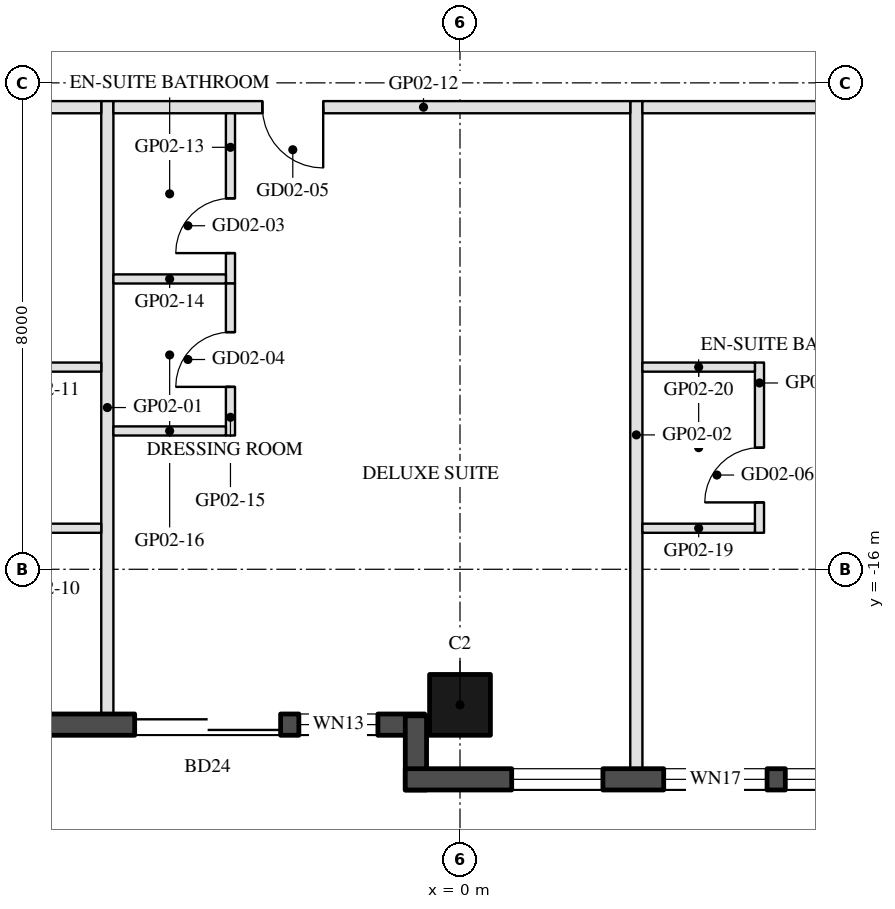
"""IFC4 building model, lengths in metres.
Left out: names, types, materials, properties, quantities, classifications, styles, units other than length and angle.
Written with IfcOpenShell. Run it as: python <this file> out.ifc"""

import sys

from ifc_helpers import new_model, si_unit, direction, frame, frame_2d, origin, origin_2d, place, context, subcontext, project, spatial, rectangle, hollow_rectangle, extrude, element, fill, save


model = new_model("IFC4")
c1 = context("Model", 3, precision=1e-05, world=origin(), true_north=direction((0.0, 1.0)))
c2 = subcontext(c1, "Body", "Model", "MODEL_VIEW")
j1 = project(units=[si_unit("LENGTHUNIT", "METRE"), si_unit("PLANEANGLEUNIT", "RADIAN")], contexts=[c1])
p1 = place(None, origin())
s1 = spatial("IfcSite", under=j1, at=p1, CompositionType="ELEMENT")
p2 = place(p1, origin())
s2 = spatial("IfcBuilding", under=s1, at=p2, CompositionType="ELEMENT")
p3 = place(p2, frame((0.0, 0.0, 53.9)))
s3 = spatial("IfcBuildingStorey", under=s2, at=p3, CompositionType="ELEMENT", Elevation=53.9)
p4 = place(p3, frame((0.0, -18.23, 0.0), z_axis=(0.0, 0.0, 1.0), x_axis=(-1.0, 0.0, 0.0)))
e1 = element("IfcColumn", 1, at=p4, inside=s3, PredefinedType="COLUMN", context=c2, shape_type="SweptSolid", body=[
    extrude(hollow_rectangle(XDim=1.0, YDim=1.0, WallThickness=0.045, at=origin_2d()), origin(), (0.0, 0.0, 1.0), 3.7),
])
p5 = place(p3, frame((-7.32, -18.555, 0.0), z_axis=(0.0, 0.0, 1.0), x_axis=(1.0, 0.0, 0.0)))
e2 = element("IfcWall", 2, at=p5, inside=s3, PredefinedType="SOLIDWALL", context=c2, shape_type="SweptSolid", body=[
    extrude(rectangle(XDim=6.74, YDim=0.35, at=frame_2d((3.37, 0.0))), origin(), (0.0, 0.0, 1.0), 3.55),
])
p6 = place(p5, frame((1.97, 0.0, 0.0)))
e3 = element("IfcOpeningElement", 3, at=p6, cuts=e2, PredefinedType="OPENING", context=c2, shape_type="SweptSolid", body=[
    extrude(rectangle(XDim=2.4, YDim=2.4, at=frame_2d((1.2, 1.2))), frame((0.0, 0.185, 0.0), z_axis=(0.0, -1.0, 0.0), x_axis=(1.0, 0.0, 0.0)), (0.0, 0.0, 1.0), 0.37),
])
p7 = place(p5, frame((4.67, 0.0, 0.3)))
e4 = element("IfcOpeningElement", 4, at=p7, cuts=e2, PredefinedType="OPENING", context=c2, shape_type="SweptSolid", body=[
    extrude(rectangle(XDim=1.3, YDim=2.65, at=frame_2d((0.65, 1.325))), frame((0.0, 0.185, 0.0), z_axis=(0.0, -1.0, 0.0), x_axis=(1.0, 0.0, 0.0)), (0.0, 0.0, 1.0), 0.37),
])
p8 = place(p3, frame((-0.725, -18.41, 0.0), z_axis=(0.0, 0.0, 1.0), x_axis=(0.0, -1.0, 0.0)))
e5 = element("IfcWall", 5, at=p8, inside=s3, PredefinedType="SOLIDWALL", context=c2, shape_type="SweptSolid", body=[
    extrude(rectangle(XDim=1.22, YDim=0.35, at=frame_2d((0.61, 0.0))), origin(), (0.0, 0.0, 1.0), 3.55),
])
p9 = place(p3, frame((-0.9, -19.455, 0.0), z_axis=(0.0, 0.0, 1.0), x_axis=(1.0, 0.0, 0.0)))
e6 = element("IfcWall", 6, at=p9, inside=s3, PredefinedType="SOLIDWALL", context=c2, shape_type="SweptSolid", body=[
    extrude(rectangle(XDim=9.7, YDim=0.35, at=frame_2d((4.85, 0.0))), origin(), (0.0, 0.0, 1.0), 3.55),
])
p10 = place(p9, frame((1.75, 0.0, 0.3)))
e7 = element("IfcOpeningElement", 7, at=p10, cuts=e6, PredefinedType="OPENING", context=c2, shape_type="SweptSolid", body=[
    extrude(rectangle(XDim=1.5, YDim=2.65, at=frame_2d((0.75, 1.325))), frame((0.0, 0.185, 0.0), z_axis=(0.0, -1.0, 0.0), x_axis=(1.0, 0.0, 0.0)), (0.0, 0.0, 1.0), 0.37),
])
p11 = place(p9, frame((4.25, 0.0, 0.3)))
e8 = element("IfcOpeningElement", 8, at=p11, cuts=e6, PredefinedType="OPENING", context=c2, shape_type="SweptSolid", body=[
    extrude(rectangle(XDim=1.7, YDim=2.65, at=frame_2d((0.85, 1.325))), frame((0.0, 0.185, 0.0), z_axis=(0.0, -1.0, 0.0), x_axis=(1.0, 0.0, 0.0)), (0.0, 0.0, 1.0), 0.37),
])
p12 = place(p9, frame((6.25, 0.0, 0.3)))
e9 = element("IfcOpeningElement", 9, at=p12, cuts=e6, PredefinedType="OPENING", context=c2, shape_type="SweptSolid", body=[
    extrude(rectangle(XDim=1.7, YDim=2.65, at=frame_2d((0.85, 1.325))), frame((0.0, 0.185, 0.0), z_axis=(0.0, -1.0, 0.0), x_axis=(1.0, 0.0, 0.0)), (0.0, 0.0, 1.0), 0.37),
])
p13 = place(p3, frame((-5.8, -18.38, 0.0), z_axis=(0.0, 0.0, 1.0), x_axis=(0.0, 1.0, 0.0)))
e10 = element("IfcWall", 10, at=p13, inside=s3, PredefinedType="PARTITIONING", context=c2, shape_type="SweptSolid", body=[
    extrude(rectangle(XDim=10.08, YDim=0.2, at=frame_2d((5.04, 0.0))), origin(), (0.0, 0.0, 1.0), 2.96),
])
p14 = place(p3, frame((2.9, -19.28, 0.0), z_axis=(0.0, 0.0, 1.0), x_axis=(0.0, 1.0, 0.0)))
e11 = element("IfcWall", 11, at=p14, inside=s3, PredefinedType="PARTITIONING", context=c2, shape_type="SweptSolid", body=[
    extrude(rectangle(XDim=10.98, YDim=0.2, at=frame_2d((5.49, 0.0))), origin(), (0.0, 0.0, 1.0), 2.96),
])
p15 = place(p3, frame((-5.9, -8.4, 0.0), z_axis=(0.0, 0.0, 1.0), x_axis=(-1.0, 0.0, 0.0)))
e12 = element("IfcWall", 12, at=p15, inside=s3, PredefinedType="PARTITIONING", context=c2, shape_type="SweptSolid", body=[
    extrude(rectangle(XDim=4.088, YDim=0.2, at=frame_2d((2.044, 0.0))), origin(), (0.0, 0.0, 1.0), 2.95),
])
p16 = place(p15, frame((1.544, 0.0, 0.0)))
e13 = element("IfcOpeningElement", 13, at=p16, cuts=e12, PredefinedType="OPENING", context=c2, shape_type="SweptSolid", body=[
    extrude(rectangle(XDim=1.0, YDim=2.1, at=frame_2d((0.5, 1.05))), frame((0.0, 0.11, 0.0), z_axis=(0.0, -1.0, 0.0), x_axis=(1.0, 0.0, 0.0)), (0.0, 0.0, 1.0), 0.22),
])
for number, where, z_axis, x_axis in (
    (14, (-7.75, -15.325, 0.0), (0.0, 0.0, 1.0), (1.0, 0.0, 0.0)),
    (15, (-7.75, -12.675, 0.0), (0.0, 0.0, 1.0), (1.0, 0.0, 0.0)),
):
    element("IfcWall", number, at=place(p3, frame(where, z_axis=z_axis, x_axis=x_axis)), inside=s3, PredefinedType="PARTITIONING", context=c2, shape_type="SweptSolid", body=[
        extrude(rectangle(XDim=1.85, YDim=0.15, at=frame_2d((0.925, 0.0))), origin(), (0.0, 0.0, 1.0), 3.55),
    ])
p17 = place(p3, frame((2.8, -8.4, 0.0), z_axis=(0.0, 0.0, 1.0), x_axis=(-1.0, 0.0, 0.0)))
e16 = element("IfcWall", 16, at=p17, inside=s3, PredefinedType="PARTITIONING", context=c2, shape_type="SweptSolid", body=[
    extrude(rectangle(XDim=8.5, YDim=0.2, at=frame_2d((4.25, 0.0))), origin(), (0.0, 0.0, 1.0), 2.95),
])
p18 = place(p17, frame((5.05, 0.0, 0.0)))
e17 = element("IfcOpeningElement", 17, at=p18, cuts=e16, PredefinedType="OPENING", context=c2, shape_type="SweptSolid", body=[
    extrude(rectangle(XDim=1.0, YDim=2.1, at=frame_2d((0.5, 1.05))), frame((0.0, 0.11, 0.0), z_axis=(0.0, -1.0, 0.0), x_axis=(1.0, 0.0, 0.0)), (0.0, 0.0, 1.0), 0.22),
])
p19 = place(p3, frame((-3.775, -11.3, 0.0), z_axis=(0.0, 0.0, 1.0), x_axis=(0.0, 1.0, 0.0)))
e18 = element("IfcWall", 18, at=p19, inside=s3, PredefinedType="PARTITIONING", context=c2, shape_type="SweptSolid", body=[
    extrude(rectangle(XDim=2.8, YDim=0.15, at=frame_2d((1.4, 0.0))), origin(), (0.0, 0.0, 1.0), 2.95),
])
p20 = place(p19, frame((0.5, 0.0, 0.0)))
e19 = element("IfcOpeningElement", 19, at=p20, cuts=e18, PredefinedType="OPENING", context=c2, shape_type="SweptSolid", body=[
    extrude(rectangle(XDim=0.9, YDim=2.1, at=frame_2d((0.45, 1.05))), frame((0.0, 0.085, 0.0), z_axis=(0.0, -1.0, 0.0), x_axis=(1.0, 0.0, 0.0)), (0.0, 0.0, 1.0), 0.17),
])
p21 = place(p3, frame((-5.7, -11.225, 0.0), z_axis=(0.0, 0.0, 1.0), x_axis=(1.0, 0.0, 0.0)))
e20 = element("IfcWall", 20, at=p21, inside=s3, PredefinedType="PARTITIONING", context=c2, shape_type="SweptSolid", body=[
    extrude(rectangle(XDim=1.85, YDim=0.15, at=frame_2d((0.925, 0.0))), origin(), (0.0, 0.0, 1.0), 2.95),
])
p22 = place(p3, frame((-3.775, -13.8, 0.0), z_axis=(0.0, 0.0, 1.0), x_axis=(0.0, 1.0, 0.0)))
e21 = element("IfcWall", 21, at=p22, inside=s3, PredefinedType="PARTITIONING", context=c2, shape_type="SweptSolid", body=[
    extrude(rectangle(XDim=2.5, YDim=0.15, at=frame_2d((1.25, 0.0))), origin(), (0.0, 0.0, 1.0), 2.95),
])
p23 = place(p22, frame((0.8, 0.0, 0.0)))
e22 = element("IfcOpeningElement", 22, at=p23, cuts=e21, PredefinedType="OPENING", context=c2, shape_type="SweptSolid", body=[
    extrude(rectangle(XDim=0.9, YDim=2.1, at=frame_2d((0.45, 1.05))), frame((0.0, 0.085, 0.0), z_axis=(0.0, -1.0, 0.0), x_axis=(1.0, 0.0, 0.0)), (0.0, 0.0, 1.0), 0.17),
])
p24 = place(p3, frame((-5.7, -13.725, 0.0), z_axis=(0.0, 0.0, 1.0), x_axis=(1.0, 0.0, 0.0)))
e23 = element("IfcWall", 23, at=p24, inside=s3, PredefinedType="PARTITIONING", context=c2, shape_type="SweptSolid", body=[
    extrude(rectangle(XDim=1.85, YDim=0.15, at=frame_2d((0.925, 0.0))), origin(), (0.0, 0.0, 1.0), 2.95),
])
p25 = place(p3, frame((9.988, -8.4, 0.0), z_axis=(0.0, 0.0, 1.0), x_axis=(-1.0, 0.0, 0.0)))
e24 = element("IfcWall", 24, at=p25, inside=s3, PredefinedType="PARTITIONING", context=c2, shape_type="SweptSolid", body=[
    extrude(rectangle(XDim=6.988, YDim=0.2, at=frame_2d((3.494, 0.0))), origin(), (0.0, 0.0, 1.0), 2.95),
])
p26 = place(p25, frame((2.994, 0.0, 0.0)))
e25 = element("IfcOpeningElement", 25, at=p26, cuts=e24, PredefinedType="OPENING", context=c2, shape_type="SweptSolid", body=[
    extrude(rectangle(XDim=1.0, YDim=2.1, at=frame_2d((0.5, 1.05))), frame((0.0, 0.11, 0.0), z_axis=(0.0, -1.0, 0.0), x_axis=(1.0, 0.0, 0.0)), (0.0, 0.0, 1.0), 0.22),
])
p27 = place(p3, frame((4.925, -15.4, 0.0), z_axis=(0.0, 0.0, 1.0), x_axis=(0.0, 1.0, 0.0)))
e26 = element("IfcWall", 26, at=p27, inside=s3, PredefinedType="PARTITIONING", context=c2, shape_type="SweptSolid", body=[
    extrude(rectangle(XDim=2.8, YDim=0.15, at=frame_2d((1.4, 0.0))), origin(), (0.0, 0.0, 1.0), 3.55),
])
p28 = place(p27, frame((0.5, 0.0, 0.0)))
e27 = element("IfcOpeningElement", 27, at=p28, cuts=e26, PredefinedType="OPENING", context=c2, shape_type="SweptSolid", body=[
    extrude(rectangle(XDim=0.9, YDim=2.1, at=frame_2d((0.45, 1.05))), frame((0.0, 0.085, 0.0), z_axis=(0.0, -1.0, 0.0), x_axis=(1.0, 0.0, 0.0)), (0.0, 0.0, 1.0), 0.17),
])
for number, where, z_axis, x_axis in (
    (28, (3.0, -15.325, 0.0), (0.0, 0.0, 1.0), (1.0, 0.0, 0.0)),
    (29, (3.0, -12.675, 0.0), (0.0, 0.0, 1.0), (1.0, 0.0, 0.0)),
):
    element("IfcWall", number, at=place(p3, frame(where, z_axis=z_axis, x_axis=x_axis)), inside=s3, PredefinedType="PARTITIONING", context=c2, shape_type="SweptSolid", body=[
        extrude(rectangle(XDim=1.85, YDim=0.15, at=frame_2d((0.925, 0.0))), origin(), (0.0, 0.0, 1.0), 2.95),
    ])
p29 = place(p6, frame((2.4, 0.0, 0.0), z_axis=(0.0, 0.0, 1.0), x_axis=(-1.0, 0.0, 0.0)))
e30 = element("IfcDoor", 30, at=p29, inside=s3, OperationType="SLIDING_TO_LEFT", PredefinedType="DOOR", context=c2, shape_type="SweptSolid", body=[
    extrude(rectangle(XDim=2.4, YDim=2.4, at=frame_2d((1.2, 1.2))), frame((0.0, 0.025, 0.0), z_axis=(0.0, -1.0, 0.0), x_axis=(1.0, 0.0, 0.0)), (0.0, 0.0, 1.0), 0.05),
])
fill(e3, e30)
p30 = place(p7, origin())
e31 = element("IfcWindow", 31, at=p30, inside=s3, PartitioningType="SINGLE_PANEL", PredefinedType="WINDOW", context=c2, shape_type="SweptSolid", body=[
    extrude(rectangle(XDim=1.3, YDim=2.65, at=frame_2d((0.65, 1.325))), frame((0.0, 0.03, 0.0), z_axis=(0.0, -1.0, 0.0), x_axis=(1.0, 0.0, 0.0)), (0.0, 0.0, 1.0), 0.06),
])
fill(e4, e31)
p31 = place(p10, origin())
e32 = element("IfcWindow", 32, at=p31, inside=s3, PartitioningType="SINGLE_PANEL", PredefinedType="WINDOW", context=c2, shape_type="SweptSolid", body=[
    extrude(rectangle(XDim=1.5, YDim=2.65, at=frame_2d((0.75, 1.325))), frame((0.0, 0.03, 0.0), z_axis=(0.0, -1.0, 0.0), x_axis=(1.0, 0.0, 0.0)), (0.0, 0.0, 1.0), 0.06),
])
fill(e7, e32)
p32 = place(p11, origin())
e33 = element("IfcWindow", 33, at=p32, inside=s3, PartitioningType="SINGLE_PANEL", PredefinedType="WINDOW", context=c2, shape_type="SweptSolid", body=[
    extrude(rectangle(XDim=1.7, YDim=2.65, at=frame_2d((0.85, 1.325))), frame((0.0, 0.03, 0.0), z_axis=(0.0, -1.0, 0.0), x_axis=(1.0, 0.0, 0.0)), (0.0, 0.0, 1.0), 0.06),
])
fill(e8, e33)
p33 = place(p12, origin())
e34 = element("IfcWindow", 34, at=p33, inside=s3, PartitioningType="SINGLE_PANEL", PredefinedType="WINDOW", context=c2, shape_type="SweptSolid", body=[
    extrude(rectangle(XDim=1.7, YDim=2.65, at=frame_2d((0.85, 1.325))), frame((0.0, 0.03, 0.0), z_axis=(0.0, -1.0, 0.0), x_axis=(1.0, 0.0, 0.0)), (0.0, 0.0, 1.0), 0.06),
])
fill(e9, e34)
p34 = place(p20, origin())
e35 = element("IfcDoor", 35, at=p34, inside=s3, OperationType="SINGLE_SWING_LEFT", PredefinedType="DOOR", context=c2, shape_type="SweptSolid", body=[
    extrude(rectangle(XDim=0.9, YDim=2.1, at=frame_2d((0.45, 1.05))), frame((0.0, 0.025, 0.0), z_axis=(0.0, -1.0, 0.0), x_axis=(1.0, 0.0, 0.0)), (0.0, 0.0, 1.0), 0.05),
])
fill(e19, e35)
p35 = place(p23, origin())
e36 = element("IfcDoor", 36, at=p35, inside=s3, OperationType="SINGLE_SWING_LEFT", PredefinedType="DOOR", context=c2, shape_type="SweptSolid", body=[
    extrude(rectangle(XDim=0.9, YDim=2.1, at=frame_2d((0.45, 1.05))), frame((0.0, 0.025, 0.0), z_axis=(0.0, -1.0, 0.0), x_axis=(1.0, 0.0, 0.0)), (0.0, 0.0, 1.0), 0.05),
])
fill(e22, e36)
p36 = place(p18, origin())
e37 = element("IfcDoor", 37, at=p36, inside=s3, OperationType="SINGLE_SWING_LEFT", PredefinedType="DOOR", context=c2, shape_type="SweptSolid", body=[
    extrude(rectangle(XDim=1.0, YDim=2.1, at=frame_2d((0.5, 1.05))), frame((0.0, 0.025, 0.0), z_axis=(0.0, -1.0, 0.0), x_axis=(1.0, 0.0, 0.0)), (0.0, 0.0, 1.0), 0.05),
])
fill(e17, e37)
p37 = place(p28, origin())
e38 = element("IfcDoor", 38, at=p37, inside=s3, OperationType="SINGLE_SWING_LEFT", PredefinedType="DOOR", context=c2, shape_type="SweptSolid", body=[
    extrude(rectangle(XDim=0.9, YDim=2.1, at=frame_2d((0.45, 1.05))), frame((0.0, 0.025, 0.0), z_axis=(0.0, -1.0, 0.0), x_axis=(1.0, 0.0, 0.0)), (0.0, 0.0, 1.0), 0.05),
])
fill(e27, e38)
save(model, sys.argv[1])
